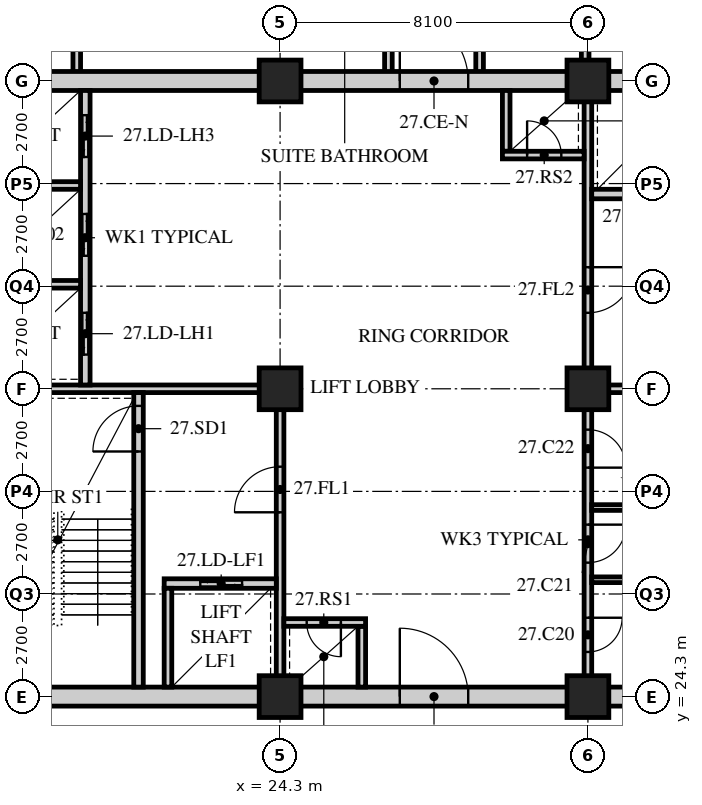
"""IFC4 building model, lengths in metres.
Left out: names, types, materials, properties, quantities, classifications, styles, units other than length and angle.
Written with IfcOpenShell. Run it as: python <this file> out.ifc"""

import sys

from ifc_helpers import new_model, si_unit, direction, frame, frame_2d, origin, origin_2d, place, context, subcontext, project, spatial, rectangle, hollow_rectangle, extrude, element, fill, save


model = new_model("IFC4")
c1 = context("Model", 3, precision=1e-05, world=origin(), true_north=direction((0.0, 1.0)))
c2 = subcontext(c1, "Body", "Model", "MODEL_VIEW")
j1 = project(units=[si_unit("LENGTHUNIT", "METRE"), si_unit("PLANEANGLEUNIT", "RADIAN")], contexts=[c1])
p1 = place(None, origin())
s1 = spatial("IfcSite", under=j1, at=p1, CompositionType="ELEMENT")
p2 = place(p1, origin())
s2 = spatial("IfcBuilding", under=s1, at=p2, CompositionType="ELEMENT")
p3 = place(p2, frame((0.0, 0.0, 110.2)))
s3 = spatial("IfcBuildingStorey", under=s2, at=p3, CompositionType="ELEMENT", Elevation=110.2)
for number, where, z_axis, x_axis in (
    (1, (24.3, 24.3, 0.0), (0.0, 0.0, 1.0), (1.0, 0.0, 0.0)),
    (2, (24.3, 32.4, 0.0), (0.0, 0.0, 1.0), (1.0, 0.0, 0.0)),
    (3, (24.3, 40.5, 0.0), (0.0, 0.0, 1.0), (1.0, 0.0, 0.0)),
    (4, (32.4, 24.3, 0.0), (0.0, 0.0, 1.0), (1.0, 0.0, 0.0)),
    (5, (32.4, 32.4, 0.0), (0.0, 0.0, 1.0), (1.0, 0.0, 0.0)),
    (6, (32.4, 40.5, 0.0), (0.0, 0.0, 1.0), (1.0, 0.0, 0.0)),
):
    element("IfcColumn", number, at=place(p3, frame(where, z_axis=z_axis, x_axis=x_axis)), inside=s3, PredefinedType="COLUMN", context=c2, shape_type="SweptSolid", body=[
        extrude(hollow_rectangle(XDim=1.1, YDim=1.1, WallThickness=0.1, at=origin_2d()), origin(), (0.0, 0.0, 1.0), 3.4),
    ])
p4 = place(p3, frame((18.95, 44.1, 0.0), z_axis=(0.0, 0.0, 1.0), x_axis=(0.0, -1.0, 0.0)))
e7 = element("IfcWall", 7, at=p4, inside=s3, PredefinedType="SOLIDWALL", context=c2, shape_type="SweptSolid", body=[
    extrude(rectangle(XDim=3.6, YDim=0.2, at=frame_2d((1.8, 0.0))), origin(), (0.0, 0.0, 1.0), 3.19),
])
p5 = place(p3, frame((32.328, 44.1, 0.0), z_axis=(0.0, 0.0, 1.0), x_axis=(0.0, -1.0, 0.0)))
e8 = element("IfcWall", 8, at=p5, inside=s3, PredefinedType="SOLIDWALL", context=c2, shape_type="SweptSolid", body=[
    extrude(rectangle(XDim=3.6, YDim=0.2, at=frame_2d((1.8, 0.0))), origin(), (0.0, 0.0, 1.0), 2.578),
])
for number, where, z_axis, x_axis in (
    (9, (27.15, 40.5, 0.0), (0.0, 0.0, 1.0), (0.0, 1.0, 0.0)),
    (10, (29.55, 40.5, 0.0), (0.0, 0.0, 1.0), (0.0, 1.0, 0.0)),
):
    element("IfcWall", number, at=place(p3, frame(where, z_axis=z_axis, x_axis=x_axis)), inside=s3, PredefinedType="SOLIDWALL", context=c2, shape_type="SweptSolid", body=[
        extrude(rectangle(XDim=3.6, YDim=0.2, at=frame_2d((1.8, 0.0))), origin(), (0.0, 0.0, 1.0), 3.19),
    ])
p6 = place(p3, frame((15.95, 24.3, 0.0), z_axis=(0.0, 0.0, 1.0), x_axis=(1.0, 0.0, 0.0)))
e11 = element("IfcWall", 11, at=p6, inside=s3, PredefinedType="SOLIDWALL", context=c2, shape_type="SweptSolid", body=[
    extrude(rectangle(XDim=24.8, YDim=0.5, at=frame_2d((12.4, 0.0))), origin(), (0.0, 0.0, 1.0), 2.54),
])
p7 = place(p6, frame((11.5, 0.0, 0.0)))
e12 = element("IfcOpeningElement", 12, at=p7, cuts=e11, PredefinedType="OPENING", context=c2, shape_type="SweptSolid", body=[
    extrude(rectangle(XDim=1.8, YDim=2.4, at=frame_2d((0.9, 1.2))), frame((0.0, 0.26, 0.0), z_axis=(0.0, -1.0, 0.0), x_axis=(1.0, 0.0, 0.0)), (0.0, 0.0, 1.0), 0.52),
])
p8 = place(p3, frame((15.95, 40.5, 0.0), z_axis=(0.0, 0.0, 1.0), x_axis=(1.0, 0.0, 0.0)))
e13 = element("IfcWall", 13, at=p8, inside=s3, PredefinedType="SOLIDWALL", context=c2, shape_type="SweptSolid", body=[
    extrude(rectangle(XDim=24.8, YDim=0.5, at=frame_2d((12.4, 0.0))), origin(), (0.0, 0.0, 1.0), 2.54),
])
p9 = place(p8, frame((11.5, 0.0, 0.0)))
e14 = element("IfcOpeningElement", 14, at=p9, cuts=e13, PredefinedType="OPENING", context=c2, shape_type="SweptSolid", body=[
    extrude(rectangle(XDim=1.8, YDim=2.4, at=frame_2d((0.9, 1.2))), frame((0.0, 0.26, 0.0), z_axis=(0.0, -1.0, 0.0), x_axis=(1.0, 0.0, 0.0)), (0.0, 0.0, 1.0), 0.52),
])
p10 = place(p3, frame((16.45, 32.4, 0.0), z_axis=(0.0, 0.0, 1.0), x_axis=(1.0, 0.0, 0.0)))
e15 = element("IfcWall", 15, at=p10, inside=s3, PredefinedType="SOLIDWALL", context=c2, shape_type="SweptSolid", body=[
    extrude(rectangle(XDim=7.95, YDim=0.2, at=frame_2d((3.975, 0.0))), origin(), (0.0, 0.0, 1.0), 2.578),
])
p11 = place(p3, frame((24.3, 24.55, 0.0), z_axis=(0.0, 0.0, 1.0), x_axis=(0.0, 1.0, 0.0)))
e16 = element("IfcWall", 16, at=p11, inside=s3, PredefinedType="SOLIDWALL", context=c2, shape_type="SweptSolid", body=[
    extrude(rectangle(XDim=7.75, YDim=0.2, at=frame_2d((3.875, 0.0))), origin(), (0.0, 0.0, 1.0), 2.578),
])
p12 = place(p11, frame((4.6, 0.0, 0.0)))
e17 = element("IfcOpeningElement", 17, at=p12, cuts=e16, PredefinedType="OPENING", context=c2, shape_type="SweptSolid", body=[
    extrude(rectangle(XDim=1.2, YDim=2.1, at=frame_2d((0.6, 1.05))), frame((0.0, 0.11, 0.0), z_axis=(0.0, -1.0, 0.0), x_axis=(1.0, 0.0, 0.0)), (0.0, 0.0, 1.0), 0.22),
])
p13 = place(p3, frame((20.575, 24.55, 0.0), z_axis=(0.0, 0.0, 1.0), x_axis=(0.0, 1.0, 0.0)))
e18 = element("IfcWall", 18, at=p13, inside=s3, PredefinedType="SOLIDWALL", context=c2, shape_type="SweptSolid", body=[
    extrude(rectangle(XDim=7.75, YDim=0.25, at=frame_2d((3.875, 0.0))), origin(), (0.0, 0.0, 1.0), 3.19),
])
p14 = place(p13, frame((6.2, 0.0, 0.0)))
e19 = element("IfcOpeningElement", 19, at=p14, cuts=e18, PredefinedType="OPENING", context=c2, shape_type="SweptSolid", body=[
    extrude(rectangle(XDim=1.2, YDim=2.1, at=frame_2d((0.6, 1.05))), frame((0.0, 0.135, 0.0), z_axis=(0.0, -1.0, 0.0), x_axis=(1.0, 0.0, 0.0)), (0.0, 0.0, 1.0), 0.27),
])
p15 = place(p3, frame((21.25, 27.275, 0.0), z_axis=(0.0, 0.0, 1.0), x_axis=(1.0, 0.0, 0.0)))
e20 = element("IfcWall", 20, at=p15, inside=s3, PredefinedType="SOLIDWALL", context=c2, shape_type="SweptSolid", body=[
    extrude(rectangle(XDim=2.95, YDim=0.25, at=frame_2d((1.475, 0.0))), origin(), (0.0, 0.0, 1.0), 3.19),
])
p16 = place(p15, frame((0.95, 0.0, 0.0)))
e21 = element("IfcOpeningElement", 21, at=p16, cuts=e20, PredefinedType="OPENING", context=c2, shape_type="SweptSolid", body=[
    extrude(rectangle(XDim=1.1, YDim=2.4, at=frame_2d((0.55, 1.2))), frame((0.0, 0.135, 0.0), z_axis=(0.0, -1.0, 0.0), x_axis=(1.0, 0.0, 0.0)), (0.0, 0.0, 1.0), 0.27),
])
p17 = place(p3, frame((21.35, 24.55, 0.0), z_axis=(0.0, 0.0, 1.0), x_axis=(0.0, 1.0, 0.0)))
e22 = element("IfcWall", 22, at=p17, inside=s3, PredefinedType="SOLIDWALL", context=c2, shape_type="SweptSolid", body=[
    extrude(rectangle(XDim=2.6, YDim=0.2, at=frame_2d((1.3, 0.0))), origin(), (0.0, 0.0, 1.0), 3.19),
])
p18 = place(p3, frame((19.175, 32.5, 0.0), z_axis=(0.0, 0.0, 1.0), x_axis=(0.0, 1.0, 0.0)))
e23 = element("IfcWall", 23, at=p18, inside=s3, PredefinedType="SOLIDWALL", context=c2, shape_type="SweptSolid", body=[
    extrude(rectangle(XDim=7.75, YDim=0.25, at=frame_2d((3.875, 0.0))), origin(), (0.0, 0.0, 1.0), 3.19),
])
p19 = place(p18, frame((0.8, 0.0, 0.0)))
e24 = element("IfcOpeningElement", 24, at=p19, cuts=e23, PredefinedType="OPENING", context=c2, shape_type="SweptSolid", body=[
    extrude(rectangle(XDim=1.1, YDim=2.4, at=frame_2d((0.55, 1.2))), frame((0.0, 0.135, 0.0), z_axis=(0.0, -1.0, 0.0), x_axis=(1.0, 0.0, 0.0)), (0.0, 0.0, 1.0), 0.27),
])
p20 = place(p18, frame((3.4, 0.0, 0.0)))
e25 = element("IfcOpeningElement", 25, at=p20, cuts=e23, PredefinedType="OPENING", context=c2, shape_type="SweptSolid", body=[
    extrude(rectangle(XDim=1.1, YDim=2.4, at=frame_2d((0.55, 1.2))), frame((0.0, 0.135, 0.0), z_axis=(0.0, -1.0, 0.0), x_axis=(1.0, 0.0, 0.0)), (0.0, 0.0, 1.0), 0.27),
])
p21 = place(p18, frame((6.0, 0.0, 0.0)))
e26 = element("IfcOpeningElement", 26, at=p21, cuts=e23, PredefinedType="OPENING", context=c2, shape_type="SweptSolid", body=[
    extrude(rectangle(XDim=1.1, YDim=2.4, at=frame_2d((0.55, 1.2))), frame((0.0, 0.135, 0.0), z_axis=(0.0, -1.0, 0.0), x_axis=(1.0, 0.0, 0.0)), (0.0, 0.0, 1.0), 0.27),
])
for number, where, z_axis, x_axis in (
    (27, (16.45, 35.15, 0.0), (0.0, 0.0, 1.0), (1.0, 0.0, 0.0)),
    (28, (16.45, 37.75, 0.0), (0.0, 0.0, 1.0), (1.0, 0.0, 0.0)),
):
    element("IfcWall", number, at=place(p3, frame(where, z_axis=z_axis, x_axis=x_axis)), inside=s3, PredefinedType="SOLIDWALL", context=c2, shape_type="SweptSolid", body=[
        extrude(rectangle(XDim=2.6, YDim=0.2, at=frame_2d((1.3, 0.0))), origin(), (0.0, 0.0, 1.0), 3.19),
    ])
p22 = place(p3, frame((26.45, 24.55, 0.0), z_axis=(0.0, 0.0, 1.0), x_axis=(0.0, 1.0, 0.0)))
e29 = element("IfcWall", 29, at=p22, inside=s3, PredefinedType="SOLIDWALL", context=c2, shape_type="SweptSolid", body=[
    extrude(rectangle(XDim=1.6, YDim=0.2, at=frame_2d((0.8, 0.0))), origin(), (0.0, 0.0, 1.0), 3.19),
])
p23 = place(p3, frame((24.4, 26.25, 0.0), z_axis=(0.0, 0.0, 1.0), x_axis=(1.0, 0.0, 0.0)))
e30 = element("IfcWall", 30, at=p23, inside=s3, PredefinedType="SOLIDWALL", context=c2, shape_type="SweptSolid", body=[
    extrude(rectangle(XDim=2.15, YDim=0.2, at=frame_2d((1.075, 0.0))), origin(), (0.0, 0.0, 1.0), 3.19),
])
p24 = place(p23, frame((0.6, 0.0, 0.0)))
e31 = element("IfcOpeningElement", 31, at=p24, cuts=e30, PredefinedType="OPENING", context=c2, shape_type="SweptSolid", body=[
    extrude(rectangle(XDim=0.9, YDim=2.1, at=frame_2d((0.45, 1.05))), frame((0.0, 0.11, 0.0), z_axis=(0.0, -1.0, 0.0), x_axis=(1.0, 0.0, 0.0)), (0.0, 0.0, 1.0), 0.22),
])
p25 = place(p3, frame((32.3, 32.4, 0.0), z_axis=(0.0, 0.0, 1.0), x_axis=(1.0, 0.0, 0.0)))
e32 = element("IfcWall", 32, at=p25, inside=s3, PredefinedType="SOLIDWALL", context=c2, shape_type="SweptSolid", body=[
    extrude(rectangle(XDim=7.95, YDim=0.2, at=frame_2d((3.975, 0.0))), origin(), (0.0, 0.0, 1.0), 2.578),
])
p26 = place(p3, frame((32.4, 32.5, 0.0), z_axis=(0.0, 0.0, 1.0), x_axis=(0.0, 1.0, 0.0)))
e33 = element("IfcWall", 33, at=p26, inside=s3, PredefinedType="SOLIDWALL", context=c2, shape_type="SweptSolid", body=[
    extrude(rectangle(XDim=7.75, YDim=0.2, at=frame_2d((3.875, 0.0))), origin(), (0.0, 0.0, 1.0), 2.578),
])
p27 = place(p26, frame((1.9, 0.0, 0.0)))
e34 = element("IfcOpeningElement", 34, at=p27, cuts=e33, PredefinedType="OPENING", context=c2, shape_type="SweptSolid", body=[
    extrude(rectangle(XDim=1.2, YDim=2.1, at=frame_2d((0.6, 1.05))), frame((0.0, 0.11, 0.0), z_axis=(0.0, -1.0, 0.0), x_axis=(1.0, 0.0, 0.0)), (0.0, 0.0, 1.0), 0.22),
])
p28 = place(p3, frame((32.5, 37.525, 0.0), z_axis=(0.0, 0.0, 1.0), x_axis=(1.0, 0.0, 0.0)))
e35 = element("IfcWall", 35, at=p28, inside=s3, PredefinedType="SOLIDWALL", context=c2, shape_type="SweptSolid", body=[
    extrude(rectangle(XDim=2.95, YDim=0.25, at=frame_2d((1.475, 0.0))), origin(), (0.0, 0.0, 1.0), 3.19),
])
p29 = place(p28, frame((0.9, 0.0, 0.0)))
e36 = element("IfcOpeningElement", 36, at=p29, cuts=e35, PredefinedType="OPENING", context=c2, shape_type="SweptSolid", body=[
    extrude(rectangle(XDim=1.1, YDim=2.4, at=frame_2d((0.55, 1.2))), frame((0.0, 0.135, 0.0), z_axis=(0.0, -1.0, 0.0), x_axis=(1.0, 0.0, 0.0)), (0.0, 0.0, 1.0), 0.27),
])
p30 = place(p3, frame((30.25, 38.65, 0.0), z_axis=(0.0, 0.0, 1.0), x_axis=(0.0, 1.0, 0.0)))
e37 = element("IfcWall", 37, at=p30, inside=s3, PredefinedType="SOLIDWALL", context=c2, shape_type="SweptSolid", body=[
    extrude(rectangle(XDim=1.6, YDim=0.2, at=frame_2d((0.8, 0.0))), origin(), (0.0, 0.0, 1.0), 3.19),
])
p31 = place(p3, frame((30.15, 38.55, 0.0), z_axis=(0.0, 0.0, 1.0), x_axis=(1.0, 0.0, 0.0)))
e38 = element("IfcWall", 38, at=p31, inside=s3, PredefinedType="SOLIDWALL", context=c2, shape_type="SweptSolid", body=[
    extrude(rectangle(XDim=2.15, YDim=0.2, at=frame_2d((1.075, 0.0))), origin(), (0.0, 0.0, 1.0), 3.19),
])
p32 = place(p31, frame((0.65, 0.0, 0.0)))
e39 = element("IfcOpeningElement", 39, at=p32, cuts=e38, PredefinedType="OPENING", context=c2, shape_type="SweptSolid", body=[
    extrude(rectangle(XDim=0.9, YDim=2.1, at=frame_2d((0.45, 1.05))), frame((0.0, 0.11, 0.0), z_axis=(0.0, -1.0, 0.0), x_axis=(1.0, 0.0, 0.0)), (0.0, 0.0, 1.0), 0.22),
])
p33 = place(p3, frame((32.4, 24.55, 0.0), z_axis=(0.0, 0.0, 1.0), x_axis=(0.0, 1.0, 0.0)))
e40 = element("IfcWall", 40, at=p33, inside=s3, PredefinedType="PARTITIONING", context=c2, shape_type="SweptSolid", body=[
    extrude(rectangle(XDim=7.75, YDim=0.2, at=frame_2d((3.875, 0.0))), origin(), (0.0, 0.0, 1.0), 2.578),
])
p34 = place(p33, frame((0.925, 0.0, 0.0)))
e41 = element("IfcOpeningElement", 41, at=p34, cuts=e40, PredefinedType="OPENING", context=c2, shape_type="SweptSolid", body=[
    extrude(rectangle(XDim=0.9, YDim=2.1, at=frame_2d((0.45, 1.05))), frame((0.0, 0.11, 0.0), z_axis=(0.0, -1.0, 0.0), x_axis=(1.0, 0.0, 0.0)), (0.0, 0.0, 1.0), 0.22),
])
p35 = place(p33, frame((3.275, 0.0, 0.0)))
e42 = element("IfcOpeningElement", 42, at=p35, cuts=e40, PredefinedType="OPENING", context=c2, shape_type="SweptSolid", body=[
    extrude(rectangle(XDim=1.0, YDim=2.1, at=frame_2d((0.5, 1.05))), frame((0.0, 0.11, 0.0), z_axis=(0.0, -1.0, 0.0), x_axis=(1.0, 0.0, 0.0)), (0.0, 0.0, 1.0), 0.22),
])
p36 = place(p33, frame((5.775, 0.0, 0.0)))
e43 = element("IfcOpeningElement", 43, at=p36, cuts=e40, PredefinedType="OPENING", context=c2, shape_type="SweptSolid", body=[
    extrude(rectangle(XDim=1.0, YDim=2.1, at=frame_2d((0.5, 1.05))), frame((0.0, 0.11, 0.0), z_axis=(0.0, -1.0, 0.0), x_axis=(1.0, 0.0, 0.0)), (0.0, 0.0, 1.0), 0.22),
])
p37 = place(p3, frame((32.5, 27.375, 0.0), z_axis=(0.0, 0.0, 1.0), x_axis=(1.0, 0.0, 0.0)))
e44 = element("IfcWall", 44, at=p37, inside=s3, PredefinedType="PARTITIONING", context=c2, shape_type="SweptSolid", body=[
    extrude(rectangle(XDim=2.15, YDim=0.15, at=frame_2d((1.075, 0.0))), origin(), (0.0, 0.0, 1.0), 3.19),
])
p38 = place(p3, frame((32.5, 29.275, 0.0), z_axis=(0.0, 0.0, 1.0), x_axis=(1.0, 0.0, 0.0)))
e45 = element("IfcWall", 45, at=p38, inside=s3, PredefinedType="PARTITIONING", context=c2, shape_type="SweptSolid", body=[
    extrude(rectangle(XDim=4.9, YDim=0.15, at=frame_2d((2.45, 0.0))), origin(), (0.0, 0.0, 1.0), 3.19),
])
p39 = place(p34, origin())
e46 = element("IfcDoor", 46, at=p39, inside=s3, OperationType="SINGLE_SWING_LEFT", PredefinedType="DOOR", context=c2, shape_type="SweptSolid", body=[
    extrude(rectangle(XDim=0.9, YDim=2.1, at=frame_2d((0.45, 1.05))), frame((0.0, 0.025, 0.0), z_axis=(0.0, -1.0, 0.0), x_axis=(1.0, 0.0, 0.0)), (0.0, 0.0, 1.0), 0.05),
])
fill(e41, e46)
p40 = place(p35, origin())
e47 = element("IfcDoor", 47, at=p40, inside=s3, OperationType="SINGLE_SWING_LEFT", PredefinedType="DOOR", context=c2, shape_type="SweptSolid", body=[
    extrude(rectangle(XDim=1.0, YDim=2.1, at=frame_2d((0.5, 1.05))), frame((0.0, 0.025, 0.0), z_axis=(0.0, -1.0, 0.0), x_axis=(1.0, 0.0, 0.0)), (0.0, 0.0, 1.0), 0.05),
])
fill(e42, e47)
p41 = place(p36, origin())
e48 = element("IfcDoor", 48, at=p41, inside=s3, OperationType="SINGLE_SWING_RIGHT", PredefinedType="DOOR", context=c2, shape_type="SweptSolid", body=[
    extrude(rectangle(XDim=1.0, YDim=2.1, at=frame_2d((0.5, 1.05))), frame((0.0, 0.025, 0.0), z_axis=(0.0, -1.0, 0.0), x_axis=(1.0, 0.0, 0.0)), (0.0, 0.0, 1.0), 0.05),
])
fill(e43, e48)
p42 = place(p14, origin())
e49 = element("IfcDoor", 49, at=p42, inside=s3, OperationType="SINGLE_SWING_LEFT", PredefinedType="DOOR", context=c2, shape_type="SweptSolid", body=[
    extrude(rectangle(XDim=1.2, YDim=2.1, at=frame_2d((0.6, 1.05))), frame((0.0, 0.025, 0.0), z_axis=(0.0, -1.0, 0.0), x_axis=(1.0, 0.0, 0.0)), (0.0, 0.0, 1.0), 0.05),
])
fill(e19, e49)
p43 = place(p12, origin())
e50 = element("IfcDoor", 50, at=p43, inside=s3, OperationType="SINGLE_SWING_LEFT", PredefinedType="DOOR", context=c2, shape_type="SweptSolid", body=[
    extrude(rectangle(XDim=1.2, YDim=2.1, at=frame_2d((0.6, 1.05))), frame((0.0, 0.025, 0.0), z_axis=(0.0, -1.0, 0.0), x_axis=(1.0, 0.0, 0.0)), (0.0, 0.0, 1.0), 0.05),
])
fill(e17, e50)
p44 = place(p24, origin())
e51 = element("IfcDoor", 51, at=p44, inside=s3, OperationType="SINGLE_SWING_LEFT", PredefinedType="DOOR", context=c2, shape_type="SweptSolid", body=[
    extrude(rectangle(XDim=0.9, YDim=2.1, at=frame_2d((0.45, 1.05))), frame((0.0, 0.025, 0.0), z_axis=(0.0, -1.0, 0.0), x_axis=(1.0, 0.0, 0.0)), (0.0, 0.0, 1.0), 0.05),
])
fill(e31, e51)
p45 = place(p27, origin())
e52 = element("IfcDoor", 52, at=p45, inside=s3, OperationType="SINGLE_SWING_LEFT", PredefinedType="DOOR", context=c2, shape_type="SweptSolid", body=[
    extrude(rectangle(XDim=1.2, YDim=2.1, at=frame_2d((0.6, 1.05))), frame((0.0, 0.025, 0.0), z_axis=(0.0, -1.0, 0.0), x_axis=(1.0, 0.0, 0.0)), (0.0, 0.0, 1.0), 0.05),
])
fill(e34, e52)
p46 = place(p32, origin())
e53 = element("IfcDoor", 53, at=p46, inside=s3, OperationType="SINGLE_SWING_LEFT", PredefinedType="DOOR", context=c2, shape_type="SweptSolid", body=[
    extrude(rectangle(XDim=0.9, YDim=2.1, at=frame_2d((0.45, 1.05))), frame((0.0, 0.025, 0.0), z_axis=(0.0, -1.0, 0.0), x_axis=(1.0, 0.0, 0.0)), (0.0, 0.0, 1.0), 0.05),
])
fill(e39, e53)
p47 = place(p19, origin())
e54 = element("IfcDoor", 54, at=p47, inside=s3, OperationType="DOUBLE_DOOR_SLIDING", PredefinedType="DOOR", context=c2, shape_type="SweptSolid", body=[
    extrude(rectangle(XDim=1.1, YDim=2.4, at=frame_2d((0.55, 1.2))), frame((0.0, 0.025, 0.0), z_axis=(0.0, -1.0, 0.0), x_axis=(1.0, 0.0, 0.0)), (0.0, 0.0, 1.0), 0.05),
])
fill(e24, e54)
p48 = place(p20, origin())
e55 = element("IfcDoor", 55, at=p48, inside=s3, OperationType="DOUBLE_DOOR_SLIDING", PredefinedType="DOOR", context=c2, shape_type="SweptSolid", body=[
    extrude(rectangle(XDim=1.1, YDim=2.4, at=frame_2d((0.55, 1.2))), frame((0.0, 0.025, 0.0), z_axis=(0.0, -1.0, 0.0), x_axis=(1.0, 0.0, 0.0)), (0.0, 0.0, 1.0), 0.05),
])
fill(e25, e55)
p49 = place(p21, origin())
e56 = element("IfcDoor", 56, at=p49, inside=s3, OperationType="DOUBLE_DOOR_SLIDING", PredefinedType="DOOR", context=c2, shape_type="SweptSolid", body=[
    extrude(rectangle(XDim=1.1, YDim=2.4, at=frame_2d((0.55, 1.2))), frame((0.0, 0.025, 0.0), z_axis=(0.0, -1.0, 0.0), x_axis=(1.0, 0.0, 0.0)), (0.0, 0.0, 1.0), 0.05),
])
fill(e26, e56)
p50 = place(p16, origin())
e57 = element("IfcDoor", 57, at=p50, inside=s3, OperationType="DOUBLE_DOOR_SLIDING", PredefinedType="DOOR", context=c2, shape_type="SweptSolid", body=[
    extrude(rectangle(XDim=1.1, YDim=2.4, at=frame_2d((0.55, 1.2))), frame((0.0, 0.025, 0.0), z_axis=(0.0, -1.0, 0.0), x_axis=(1.0, 0.0, 0.0)), (0.0, 0.0, 1.0), 0.05),
])
fill(e21, e57)
p51 = place(p7, origin())
e58 = element("IfcDoor", 58, at=p51, inside=s3, OperationType="DOUBLE_DOOR_SINGLE_SWING", PredefinedType="DOOR", context=c2, shape_type="SweptSolid", body=[
    extrude(rectangle(XDim=1.8, YDim=2.4, at=frame_2d((0.9, 1.2))), frame((0.0, 0.025, 0.0), z_axis=(0.0, -1.0, 0.0), x_axis=(1.0, 0.0, 0.0)), (0.0, 0.0, 1.0), 0.05),
])
fill(e12, e58)
p52 = place(p9, origin())
e59 = element("IfcDoor", 59, at=p52, inside=s3, OperationType="DOUBLE_DOOR_SINGLE_SWING", PredefinedType="DOOR", context=c2, shape_type="SweptSolid", body=[
    extrude(rectangle(XDim=1.8, YDim=2.4, at=frame_2d((0.9, 1.2))), frame((0.0, 0.025, 0.0), z_axis=(0.0, -1.0, 0.0), x_axis=(1.0, 0.0, 0.0)), (0.0, 0.0, 1.0), 0.05),
])
fill(e14, e59)
save(model, sys.argv[1])
